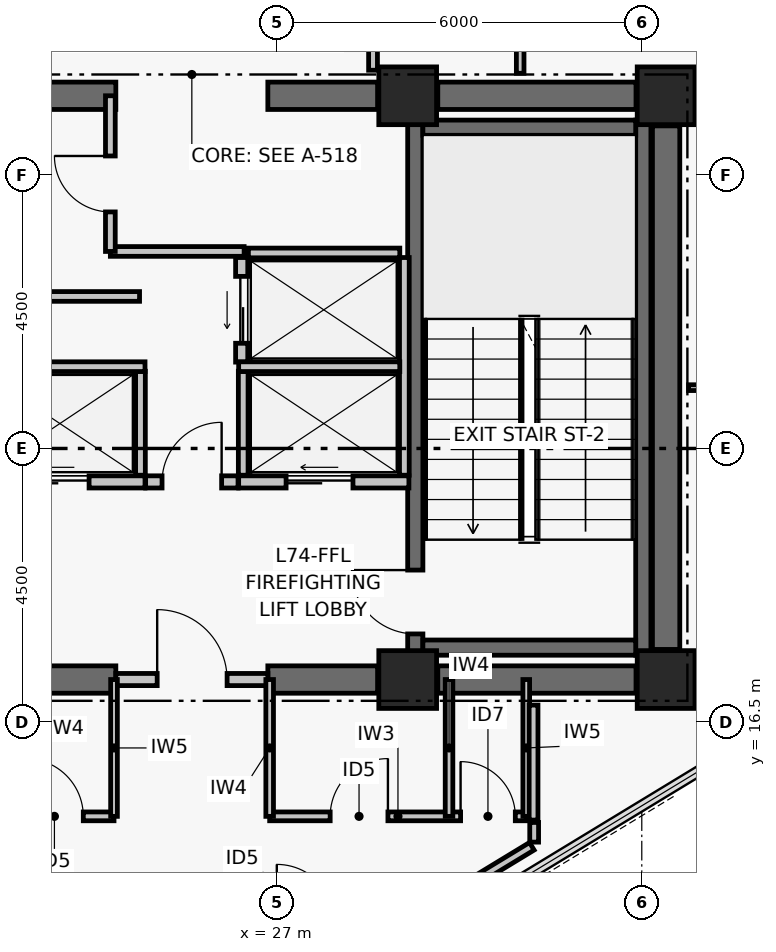
"""IFC4 building model, lengths in metres.
Left out: names, types, materials, properties, quantities, classifications, styles, units other than length and angle.
Written with IfcOpenShell. Run it as: python <this file> out.ifc"""

import sys

from ifc_helpers import new_model, si_unit, direction, frame, frame_2d, origin, origin_2d, place, context, subcontext, project, spatial, rectangle, extrude, element, fill, save


model = new_model("IFC4")
c1 = context("Model", 3, precision=1e-05, world=origin(), true_north=direction((0.0, 1.0)))
c2 = subcontext(c1, "Body", "Model", "MODEL_VIEW")
j1 = project(units=[si_unit("LENGTHUNIT", "METRE"), si_unit("PLANEANGLEUNIT", "RADIAN")], contexts=[c1])
p1 = place(None, origin())
s1 = spatial("IfcSite", under=j1, at=p1, CompositionType="ELEMENT")
p2 = place(p1, origin())
s2 = spatial("IfcBuilding", under=s1, at=p2, CompositionType="ELEMENT")
p3 = place(p2, frame((0.0, 0.0, 291.78)))
s3 = spatial("IfcBuildingStorey", under=s2, at=p3, CompositionType="ELEMENT", Elevation=291.78)
for number, where, z_axis, x_axis in (
    (1, (29.15, 17.2, 0.0), (0.0, 0.0, 1.0), (1.0, 0.0, 0.0)),
    (2, (33.4, 17.2, 0.0), (0.0, 0.0, 1.0), (1.0, 0.0, 0.0)),
    (3, (29.15, 26.8, 0.0), (0.0, 0.0, 1.0), (1.0, 0.0, 0.0)),
    (4, (33.4, 26.8, 0.0), (0.0, 0.0, 1.0), (1.0, 0.0, 0.0)),
):
    element("IfcColumn", number, at=place(p3, frame(where, z_axis=z_axis, x_axis=x_axis)), inside=s3, PredefinedType="COLUMN", context=c2, shape_type="SweptSolid", body=[
        extrude(rectangle(XDim=0.95, YDim=0.95, at=origin_2d()), origin(), (0.0, 0.0, 1.0), 3.72),
    ])
p4 = place(p3, frame((22.545, 17.2, 0.0), z_axis=(0.0, 0.0, 1.0), x_axis=(1.0, 0.0, 0.0)))
e5 = element("IfcWall", 5, at=p4, inside=s3, PredefinedType="SHEAR", context=c2, shape_type="SweptSolid", body=[
    extrude(rectangle(XDim=1.805, YDim=0.45, at=frame_2d((0.903, 0.0))), origin(), (0.0, 0.0, 1.0), 3.5),
])
p5 = place(p3, frame((26.85, 17.2, 0.0), z_axis=(0.0, 0.0, 1.0), x_axis=(1.0, 0.0, 0.0)))
e6 = element("IfcWall", 6, at=p5, inside=s3, PredefinedType="SHEAR", context=c2, shape_type="SweptSolid", body=[
    extrude(rectangle(XDim=1.805, YDim=0.45, at=frame_2d((0.902, 0.0))), origin(), (0.0, 0.0, 1.0), 3.5),
])
p6 = place(p3, frame((29.645, 17.2, 0.0), z_axis=(0.0, 0.0, 1.0), x_axis=(1.0, 0.0, 0.0)))
e7 = element("IfcWall", 7, at=p6, inside=s3, PredefinedType="SHEAR", context=c2, shape_type="SweptSolid", body=[
    extrude(rectangle(XDim=3.26, YDim=0.45, at=frame_2d((1.63, 0.0))), origin(), (0.0, 0.0, 1.0), 3.5),
])
p7 = place(p3, frame((22.545, 26.8, 0.0), z_axis=(0.0, 0.0, 1.0), x_axis=(1.0, 0.0, 0.0)))
e8 = element("IfcWall", 8, at=p7, inside=s3, PredefinedType="SHEAR", context=c2, shape_type="SweptSolid", body=[
    extrude(rectangle(XDim=1.805, YDim=0.45, at=frame_2d((0.903, 0.0))), origin(), (0.0, 0.0, 1.0), 3.5),
])
p8 = place(p3, frame((26.85, 26.8, 0.0), z_axis=(0.0, 0.0, 1.0), x_axis=(1.0, 0.0, 0.0)))
e9 = element("IfcWall", 9, at=p8, inside=s3, PredefinedType="SHEAR", context=c2, shape_type="SweptSolid", body=[
    extrude(rectangle(XDim=1.805, YDim=0.45, at=frame_2d((0.902, 0.0))), origin(), (0.0, 0.0, 1.0), 3.5),
])
p9 = place(p3, frame((29.645, 26.8, 0.0), z_axis=(0.0, 0.0, 1.0), x_axis=(1.0, 0.0, 0.0)))
e10 = element("IfcWall", 10, at=p9, inside=s3, PredefinedType="SHEAR", context=c2, shape_type="SweptSolid", body=[
    extrude(rectangle(XDim=3.26, YDim=0.45, at=frame_2d((1.63, 0.0))), origin(), (0.0, 0.0, 1.0), 3.5),
])
p10 = place(p3, frame((33.4, 17.695, 0.0), z_axis=(0.0, 0.0, 1.0), x_axis=(0.0, 1.0, 0.0)))
e11 = element("IfcWall", 11, at=p10, inside=s3, PredefinedType="SHEAR", context=c2, shape_type="SweptSolid", body=[
    extrude(rectangle(XDim=8.61, YDim=0.45, at=frame_2d((4.305, 0.0))), origin(), (0.0, 0.0, 1.0), 3.5),
])
p11 = place(p3, frame((29.275, 17.6, 0.0), z_axis=(0.0, 0.0, 1.0), x_axis=(0.0, 1.0, 0.0)))
e12 = element("IfcWall", 12, at=p11, inside=s3, PredefinedType="SHEAR", context=c2, shape_type="SweptSolid", body=[
    extrude(rectangle(XDim=8.8, YDim=0.25, at=frame_2d((4.4, 0.0))), origin(), (0.0, 0.0, 1.0), 3.5),
])
p12 = place(p11, frame((0.35, 0.0, 0.0)))
e13 = element("IfcOpeningElement", 13, at=p12, cuts=e12, PredefinedType="OPENING", context=c2, shape_type="SweptSolid", body=[
    extrude(rectangle(XDim=1.05, YDim=2.08, at=frame_2d((0.525, 1.04))), frame((0.0, 0.135, 0.0), z_axis=(0.0, -1.0, 0.0), x_axis=(1.0, 0.0, 0.0)), (0.0, 0.0, 1.0), 0.27),
])
p13 = place(p3, frame((33.025, 17.6, 0.0), z_axis=(0.0, 0.0, 1.0), x_axis=(0.0, 1.0, 0.0)))
e14 = element("IfcWall", 14, at=p13, inside=s3, PredefinedType="SHEAR", context=c2, shape_type="SweptSolid", body=[
    extrude(rectangle(XDim=8.8, YDim=0.25, at=frame_2d((4.4, 0.0))), origin(), (0.0, 0.0, 1.0), 3.5),
])
for number, where, z_axis, x_axis in (
    (15, (29.4, 17.725, 0.0), (0.0, 0.0, 1.0), (1.0, 0.0, 0.0)),
    (16, (29.4, 26.275, 0.0), (0.0, 0.0, 1.0), (1.0, 0.0, 0.0)),
):
    element("IfcWall", number, at=place(p3, frame(where, z_axis=z_axis, x_axis=x_axis)), inside=s3, PredefinedType="SHEAR", context=c2, shape_type="SweptSolid", body=[
        extrude(rectangle(XDim=3.5, YDim=0.25, at=frame_2d((1.75, 0.0))), origin(), (0.0, 0.0, 1.0), 3.5),
    ])
p14 = place(p3, frame((24.35, 17.2, 0.0), z_axis=(0.0, 0.0, 1.0), x_axis=(1.0, 0.0, 0.0)))
e17 = element("IfcWall", 17, at=p14, inside=s3, PredefinedType="PARTITIONING", context=c2, shape_type="SweptSolid", body=[
    extrude(rectangle(XDim=2.5, YDim=0.2, at=frame_2d((1.25, 0.0))), origin(), (0.0, 0.0, 1.0), 2.63),
])
p15 = place(p14, frame((0.68, 0.0, 0.0)))
e18 = element("IfcOpeningElement", 18, at=p15, cuts=e17, PredefinedType="OPENING", context=c2, shape_type="SweptSolid", body=[
    extrude(rectangle(XDim=1.15, YDim=2.08, at=frame_2d((0.575, 1.04))), frame((0.0, 0.11, 0.0), z_axis=(0.0, -1.0, 0.0), x_axis=(1.0, 0.0, 0.0)), (0.0, 0.0, 1.0), 0.22),
])
p16 = place(p3, frame((24.84, 20.45, 0.0), z_axis=(0.0, 0.0, 1.0), x_axis=(1.0, 0.0, 0.0)))
e19 = element("IfcWall", 19, at=p16, inside=s3, PredefinedType="PARTITIONING", context=c2, shape_type="SweptSolid", body=[
    extrude(rectangle(XDim=1.52, YDim=0.2, at=frame_2d((0.76, 0.0))), origin(), (0.0, 0.0, 1.0), 3.5),
])
p17 = place(p16, frame((0.27, 0.0, 0.0)))
e20 = element("IfcOpeningElement", 20, at=p17, cuts=e19, PredefinedType="OPENING", context=c2, shape_type="SweptSolid", body=[
    extrude(rectangle(XDim=0.98, YDim=2.06, at=frame_2d((0.49, 1.03))), frame((0.0, 0.11, 0.0), z_axis=(0.0, -1.0, 0.0), x_axis=(1.0, 0.0, 0.0)), (0.0, 0.0, 1.0), 0.22),
])
p18 = place(p3, frame((22.03, 20.45, 0.0), z_axis=(0.0, 0.0, 1.0), x_axis=(1.0, 0.0, 0.0)))
e21 = element("IfcWall", 21, at=p18, inside=s3, PredefinedType="PARTITIONING", context=c2, shape_type="SweptSolid", body=[
    extrude(rectangle(XDim=2.8, YDim=0.2, at=frame_2d((1.4, 0.0))), origin(), (0.0, 0.0, 1.0), 3.5),
])
p19 = place(p18, frame((0.78, 0.0, 0.0)))
e22 = element("IfcOpeningElement", 22, at=p19, cuts=e21, PredefinedType="OPENING", context=c2, shape_type="SweptSolid", body=[
    extrude(rectangle(XDim=1.1, YDim=2.08, at=frame_2d((0.55, 1.04))), frame((0.0, 0.11, 0.0), z_axis=(0.0, -1.0, 0.0), x_axis=(1.0, 0.0, 0.0)), (0.0, 0.0, 1.0), 0.22),
])
p20 = place(p3, frame((26.37, 20.45, 0.0), z_axis=(0.0, 0.0, 1.0), x_axis=(1.0, 0.0, 0.0)))
e23 = element("IfcWall", 23, at=p20, inside=s3, PredefinedType="PARTITIONING", context=c2, shape_type="SweptSolid", body=[
    extrude(rectangle(XDim=2.8, YDim=0.2, at=frame_2d((1.4, 0.0))), origin(), (0.0, 0.0, 1.0), 3.5),
])
p21 = place(p20, frame((0.78, 0.0, 0.0)))
e24 = element("IfcOpeningElement", 24, at=p21, cuts=e23, PredefinedType="OPENING", context=c2, shape_type="SweptSolid", body=[
    extrude(rectangle(XDim=1.1, YDim=2.08, at=frame_2d((0.55, 1.04))), frame((0.0, 0.11, 0.0), z_axis=(0.0, -1.0, 0.0), x_axis=(1.0, 0.0, 0.0)), (0.0, 0.0, 1.0), 0.22),
])
p22 = place(p3, frame((26.42, 22.42, 0.0), z_axis=(0.0, 0.0, 1.0), x_axis=(0.0, 1.0, 0.0)))
e25 = element("IfcWall", 25, at=p22, inside=s3, PredefinedType="PARTITIONING", context=c2, shape_type="SweptSolid", body=[
    extrude(rectangle(XDim=1.72, YDim=0.2, at=frame_2d((0.86, 0.0))), origin(), (0.0, 0.0, 1.0), 3.5),
])
p23 = place(p22, frame((0.31, 0.0, 0.0)))
e26 = element("IfcOpeningElement", 26, at=p23, cuts=e25, PredefinedType="OPENING", context=c2, shape_type="SweptSolid", body=[
    extrude(rectangle(XDim=1.1, YDim=2.08, at=frame_2d((0.55, 1.04))), frame((0.0, 0.11, 0.0), z_axis=(0.0, -1.0, 0.0), x_axis=(1.0, 0.0, 0.0)), (0.0, 0.0, 1.0), 0.22),
])
p24 = place(p3, frame((24.755, 20.56, 0.0), z_axis=(0.0, 0.0, 1.0), x_axis=(0.0, 1.0, 0.0)))
e27 = element("IfcWall", 27, at=p24, inside=s3, PredefinedType="PARTITIONING", context=c2, shape_type="SweptSolid", body=[
    extrude(rectangle(XDim=1.71, YDim=0.16, at=frame_2d((0.855, 0.0))), origin(), (0.0, 0.0, 1.0), 3.5),
])
p25 = place(p3, frame((22.18, 22.345, 0.0), z_axis=(0.0, 0.0, 1.0), x_axis=(1.0, 0.0, 0.0)))
e28 = element("IfcWall", 28, at=p25, inside=s3, PredefinedType="PARTITIONING", context=c2, shape_type="SweptSolid", body=[
    extrude(rectangle(XDim=2.65, YDim=0.16, at=frame_2d((1.325, 0.0))), origin(), (0.0, 0.0, 1.0), 3.5),
])
p26 = place(p3, frame((29.095, 20.56, 0.0), z_axis=(0.0, 0.0, 1.0), x_axis=(0.0, 1.0, 0.0)))
e29 = element("IfcWall", 29, at=p26, inside=s3, PredefinedType="PARTITIONING", context=c2, shape_type="SweptSolid", body=[
    extrude(rectangle(XDim=3.58, YDim=0.16, at=frame_2d((1.79, 0.0))), origin(), (0.0, 0.0, 1.0), 3.5),
])
p27 = place(p3, frame((26.445, 20.56, 0.0), z_axis=(0.0, 0.0, 1.0), x_axis=(0.0, 1.0, 0.0)))
e30 = element("IfcWall", 30, at=p27, inside=s3, PredefinedType="PARTITIONING", context=c2, shape_type="SweptSolid", body=[
    extrude(rectangle(XDim=1.71, YDim=0.16, at=frame_2d((0.855, 0.0))), origin(), (0.0, 0.0, 1.0), 3.5),
])
p28 = place(p3, frame((26.37, 22.345, 0.0), z_axis=(0.0, 0.0, 1.0), x_axis=(1.0, 0.0, 0.0)))
e31 = element("IfcWall", 31, at=p28, inside=s3, PredefinedType="PARTITIONING", context=c2, shape_type="SweptSolid", body=[
    extrude(rectangle(XDim=2.65, YDim=0.16, at=frame_2d((1.325, 0.0))), origin(), (0.0, 0.0, 1.0), 3.5),
])
p29 = place(p3, frame((26.53, 24.215, 0.0), z_axis=(0.0, 0.0, 1.0), x_axis=(1.0, 0.0, 0.0)))
e32 = element("IfcWall", 32, at=p29, inside=s3, PredefinedType="PARTITIONING", context=c2, shape_type="SweptSolid", body=[
    extrude(rectangle(XDim=2.49, YDim=0.16, at=frame_2d((1.245, 0.0))), origin(), (0.0, 0.0, 1.0), 3.5),
])
p30 = place(p3, frame((23.04, 23.5, 0.0), z_axis=(0.0, 0.0, 1.0), x_axis=(1.0, 0.0, 0.0)))
e33 = element("IfcWall", 33, at=p30, inside=s3, PredefinedType="PARTITIONING", context=c2, shape_type="SweptSolid", body=[
    extrude(rectangle(XDim=1.7, YDim=0.16, at=frame_2d((0.85, 0.0))), origin(), (0.0, 0.0, 1.0), 3.5),
])
p31 = place(p3, frame((24.26, 24.24, 0.0), z_axis=(0.0, 0.0, 1.0), x_axis=(1.0, 0.0, 0.0)))
e34 = element("IfcWall", 34, at=p31, inside=s3, PredefinedType="PARTITIONING", context=c2, shape_type="SweptSolid", body=[
    extrude(rectangle(XDim=2.2, YDim=0.16, at=frame_2d((1.1, 0.0))), origin(), (0.0, 0.0, 1.0), 3.5),
])
p32 = place(p3, frame((24.26, 24.24, 0.0), z_axis=(0.0, 0.0, 1.0), x_axis=(0.0, 1.0, 0.0)))
e35 = element("IfcWall", 35, at=p32, inside=s3, PredefinedType="PARTITIONING", context=c2, shape_type="SweptSolid", body=[
    extrude(rectangle(XDim=2.56, YDim=0.16, at=frame_2d((1.28, 0.0))), origin(), (0.0, 0.0, 1.0), 2.63),
])
p33 = place(p32, frame((0.65, 0.0, 0.0)))
e36 = element("IfcOpeningElement", 36, at=p33, cuts=e35, PredefinedType="OPENING", context=c2, shape_type="SweptSolid", body=[
    extrude(rectangle(XDim=0.92, YDim=2.05, at=frame_2d((0.46, 1.025))), frame((0.0, 0.09, 0.0), z_axis=(0.0, -1.0, 0.0), x_axis=(1.0, 0.0, 0.0)), (0.0, 0.0, 1.0), 0.18),
])
p34 = place(p3, frame((19.1, 14.95, 0.0), z_axis=(0.0, 0.0, 1.0), x_axis=(1.0, 0.0, 0.0)))
e37 = element("IfcWall", 37, at=p34, inside=s3, PredefinedType="PARTITIONING", context=c2, shape_type="SweptSolid", body=[
    extrude(rectangle(XDim=5.22, YDim=0.145, at=frame_2d((2.61, 0.0))), origin(), (0.0, 0.0, 1.0), 2.83),
])
p35 = place(p34, frame((0.2, 0.0, 0.0)))
e38 = element("IfcOpeningElement", 38, at=p35, cuts=e37, PredefinedType="OPENING", context=c2, shape_type="SweptSolid", body=[
    extrude(rectangle(XDim=0.9, YDim=2.02, at=frame_2d((0.45, 1.01))), frame((0.0, 0.083, 0.0), z_axis=(0.0, -1.0, 0.0), x_axis=(1.0, 0.0, 0.0)), (0.0, 0.0, 1.0), 0.165),
])
p36 = place(p34, frame((1.805, 0.0, 0.0)))
e39 = element("IfcOpeningElement", 39, at=p36, cuts=e37, PredefinedType="OPENING", context=c2, shape_type="SweptSolid", body=[
    extrude(rectangle(XDim=0.95, YDim=2.06, at=frame_2d((0.475, 1.03))), frame((0.0, 0.083, 0.0), z_axis=(0.0, -1.0, 0.0), x_axis=(1.0, 0.0, 0.0)), (0.0, 0.0, 1.0), 0.165),
])
p37 = place(p34, frame((3.765, 0.0, 0.0)))
e40 = element("IfcOpeningElement", 40, at=p37, cuts=e37, PredefinedType="OPENING", context=c2, shape_type="SweptSolid", body=[
    extrude(rectangle(XDim=0.95, YDim=2.06, at=frame_2d((0.475, 1.03))), frame((0.0, 0.083, 0.0), z_axis=(0.0, -1.0, 0.0), x_axis=(1.0, 0.0, 0.0)), (0.0, 0.0, 1.0), 0.165),
])
p38 = place(p3, frame((26.88, 14.95, 0.0), z_axis=(0.0, 0.0, 1.0), x_axis=(1.0, 0.0, 0.0)))
e41 = element("IfcWall", 41, at=p38, inside=s3, PredefinedType="PARTITIONING", context=c2, shape_type="SweptSolid", body=[
    extrude(rectangle(XDim=4.22, YDim=0.145, at=frame_2d((2.11, 0.0))), origin(), (0.0, 0.0, 1.0), 2.98),
])
p39 = place(p38, frame((0.995, 0.0, 0.0)))
e42 = element("IfcOpeningElement", 42, at=p39, cuts=e41, PredefinedType="OPENING", context=c2, shape_type="SweptSolid", body=[
    extrude(rectangle(XDim=0.95, YDim=2.06, at=frame_2d((0.475, 1.03))), frame((0.0, 0.083, 0.0), z_axis=(0.0, -1.0, 0.0), x_axis=(1.0, 0.0, 0.0)), (0.0, 0.0, 1.0), 0.165),
])
p40 = place(p38, frame((3.14, 0.0, 0.0)))
e43 = element("IfcOpeningElement", 43, at=p40, cuts=e41, PredefinedType="OPENING", context=c2, shape_type="SweptSolid", body=[
    extrude(rectangle(XDim=0.9, YDim=2.02, at=frame_2d((0.45, 1.01))), frame((0.0, 0.083, 0.0), z_axis=(0.0, -1.0, 0.0), x_axis=(1.0, 0.0, 0.0)), (0.0, 0.0, 1.0), 0.165),
])
p41 = place(p3, frame((24.32, 14.95, 0.0), z_axis=(0.0, 0.0, 1.0), x_axis=(0.0, 1.0, 0.0)))
e44 = element("IfcWall", 44, at=p41, inside=s3, PredefinedType="PARTITIONING", context=c2, shape_type="SweptSolid", body=[
    extrude(rectangle(XDim=2.25, YDim=0.11, at=frame_2d((1.125, 0.0))), origin(), (0.0, 0.0, 1.0), 2.63),
])
for number, where, z_axis, x_axis in (
    (45, (26.88, 14.95, 0.0), (0.0, 0.0, 1.0), (0.0, 1.0, 0.0)),
    (46, (29.83, 14.95, 0.0), (0.0, 0.0, 1.0), (0.0, 1.0, 0.0)),
):
    element("IfcWall", number, at=place(p3, frame(where, z_axis=z_axis, x_axis=x_axis)), inside=s3, PredefinedType="PARTITIONING", context=c2, shape_type="SweptSolid", body=[
        extrude(rectangle(XDim=2.25, YDim=0.125, at=frame_2d((1.125, 0.0))), origin(), (0.0, 0.0, 1.0), 2.63),
    ])
p42 = place(p3, frame((31.1, 14.95, 0.0), z_axis=(0.0, 0.0, 1.0), x_axis=(0.0, 1.0, 0.0)))
e47 = element("IfcWall", 47, at=p42, inside=s3, PredefinedType="PARTITIONING", context=c2, shape_type="SweptSolid", body=[
    extrude(rectangle(XDim=2.25, YDim=0.11, at=frame_2d((1.125, 0.0))), origin(), (0.0, 0.0, 1.0), 2.63),
])
p43 = place(p3, frame((29.168, 13.229, 0.0), z_axis=(0.0, 0.0, 1.0), x_axis=(0.854678044033, 0.519158396876, 0.0)))
e48 = element("IfcWall", 48, at=p43, inside=s3, PredefinedType="PARTITIONING", context=c2, shape_type="SweptSolid", body=[
    extrude(rectangle(XDim=2.368, YDim=0.145, at=frame_2d((1.184, 0.0))), origin(), (0.0, 0.0, 1.0), 3.5),
])
p44 = place(p3, frame((31.23, 14.526, 0.0), z_axis=(0.0, 0.0, 1.0), x_axis=(0.0, 1.0, 0.0)))
e49 = element("IfcWall", 49, at=p44, inside=s3, PredefinedType="PARTITIONING", context=c2, shape_type="SweptSolid", body=[
    extrude(rectangle(XDim=0.324, YDim=0.145, at=frame_2d((0.162, 0.0))), origin(), (0.0, 0.0, 1.0), 3.5),
])
p45 = place(p3, frame((31.22, 14.889, 0.0), z_axis=(0.0, 0.0, 1.0), x_axis=(0.0, 1.0, 0.0)))
e50 = element("IfcWall", 50, at=p45, inside=s3, PredefinedType="PARTITIONING", context=c2, shape_type="SweptSolid", body=[
    extrude(rectangle(XDim=1.891, YDim=0.145, at=frame_2d((0.946, 0.0))), origin(), (0.0, 0.0, 1.0), 2.63),
])
p46 = place(p3, frame((28.58, 27.22, 0.0), z_axis=(0.0, 0.0, 1.0), x_axis=(0.0, 1.0, 0.0)))
e51 = element("IfcWall", 51, at=p46, inside=s3, PredefinedType="PARTITIONING", context=c2, shape_type="SweptSolid", body=[
    extrude(rectangle(XDim=1.48, YDim=0.145, at=frame_2d((0.74, 0.0))), origin(), (0.0, 0.0, 1.0), 2.63),
])
p47 = place(p3, frame((31.0, 27.17, 0.0), z_axis=(0.0, 0.0, 1.0), x_axis=(0.0, 1.0, 0.0)))
e52 = element("IfcWall", 52, at=p47, inside=s3, PredefinedType="PARTITIONING", context=c2, shape_type="SweptSolid", body=[
    extrude(rectangle(XDim=2.933, YDim=0.125, at=frame_2d((1.467, 0.0))), origin(), (0.0, 0.0, 1.0), 2.63),
])
p48 = place(p3, frame((33.77, 22.0, 0.0), z_axis=(0.0, 0.0, 1.0), x_axis=(1.0, 0.0, 0.0)))
e53 = element("IfcWall", 53, at=p48, inside=s3, PredefinedType="PARTITIONING", context=c2, shape_type="SweptSolid", body=[
    extrude(rectangle(XDim=7.412, YDim=0.095, at=frame_2d((3.706, 0.0))), origin(), (0.0, 0.0, 1.0), 2.63),
])
p49 = place(p48, frame((0.28, 0.0, 0.0)))
e54 = element("IfcOpeningElement", 54, at=p49, cuts=e53, PredefinedType="OPENING", context=c2, shape_type="SweptSolid", body=[
    extrude(rectangle(XDim=0.92, YDim=2.05, at=frame_2d((0.46, 1.025))), frame((0.0, 0.057, 0.0), z_axis=(0.0, -1.0, 0.0), x_axis=(1.0, 0.0, 0.0)), (0.0, 0.0, 1.0), 0.115),
])
p50 = place(p12, origin())
e55 = element("IfcDoor", 55, at=p50, inside=s3, OperationType="SINGLE_SWING_RIGHT", PredefinedType="DOOR", context=c2, shape_type="SweptSolid", body=[
    extrude(rectangle(XDim=1.05, YDim=2.08, at=frame_2d((0.525, 1.04))), frame((0.0, 0.025, 0.0), z_axis=(0.0, -1.0, 0.0), x_axis=(1.0, 0.0, 0.0)), (0.0, 0.0, 1.0), 0.05),
])
fill(e13, e55)
p51 = place(p15, origin())
e56 = element("IfcDoor", 56, at=p51, inside=s3, OperationType="SINGLE_SWING_LEFT", PredefinedType="DOOR", context=c2, shape_type="SweptSolid", body=[
    extrude(rectangle(XDim=1.15, YDim=2.08, at=frame_2d((0.575, 1.04))), frame((0.0, 0.025, 0.0), z_axis=(0.0, -1.0, 0.0), x_axis=(1.0, 0.0, 0.0)), (0.0, 0.0, 1.0), 0.05),
])
fill(e18, e56)
p52 = place(p17, origin())
e57 = element("IfcDoor", 57, at=p52, inside=s3, OperationType="SINGLE_SWING_RIGHT", PredefinedType="DOOR", context=c2, shape_type="SweptSolid", body=[
    extrude(rectangle(XDim=0.98, YDim=2.06, at=frame_2d((0.49, 1.03))), frame((0.0, 0.025, 0.0), z_axis=(0.0, -1.0, 0.0), x_axis=(1.0, 0.0, 0.0)), (0.0, 0.0, 1.0), 0.05),
])
fill(e20, e57)
p53 = place(p19, origin())
e58 = element("IfcDoor", 58, at=p53, inside=s3, OperationType="DOUBLE_DOOR_SLIDING", PredefinedType="DOOR", context=c2, shape_type="SweptSolid", body=[
    extrude(rectangle(XDim=1.1, YDim=2.08, at=frame_2d((0.55, 1.04))), frame((0.0, 0.025, 0.0), z_axis=(0.0, -1.0, 0.0), x_axis=(1.0, 0.0, 0.0)), (0.0, 0.0, 1.0), 0.05),
])
fill(e22, e58)
p54 = place(p21, origin())
e59 = element("IfcDoor", 59, at=p54, inside=s3, OperationType="DOUBLE_DOOR_SLIDING", PredefinedType="DOOR", context=c2, shape_type="SweptSolid", body=[
    extrude(rectangle(XDim=1.1, YDim=2.08, at=frame_2d((0.55, 1.04))), frame((0.0, 0.025, 0.0), z_axis=(0.0, -1.0, 0.0), x_axis=(1.0, 0.0, 0.0)), (0.0, 0.0, 1.0), 0.05),
])
fill(e24, e59)
p55 = place(p23, origin())
e60 = element("IfcDoor", 60, at=p55, inside=s3, OperationType="DOUBLE_DOOR_SLIDING", PredefinedType="DOOR", context=c2, shape_type="SweptSolid", body=[
    extrude(rectangle(XDim=1.1, YDim=2.08, at=frame_2d((0.55, 1.04))), frame((0.0, 0.025, 0.0), z_axis=(0.0, -1.0, 0.0), x_axis=(1.0, 0.0, 0.0)), (0.0, 0.0, 1.0), 0.05),
])
fill(e26, e60)
p56 = place(p33, origin())
e61 = element("IfcDoor", 61, at=p56, inside=s3, OperationType="SINGLE_SWING_RIGHT", PredefinedType="DOOR", context=c2, shape_type="SweptSolid", body=[
    extrude(rectangle(XDim=0.92, YDim=2.05, at=frame_2d((0.46, 1.025))), frame((0.0, 0.025, 0.0), z_axis=(0.0, -1.0, 0.0), x_axis=(1.0, 0.0, 0.0)), (0.0, 0.0, 1.0), 0.05),
])
fill(e36, e61)
p57 = place(p37, origin())
e62 = element("IfcDoor", 62, at=p57, inside=s3, OperationType="SINGLE_SWING_LEFT", PredefinedType="DOOR", context=c2, shape_type="SweptSolid", body=[
    extrude(rectangle(XDim=0.95, YDim=2.06, at=frame_2d((0.475, 1.03))), frame((0.0, 0.025, 0.0), z_axis=(0.0, -1.0, 0.0), x_axis=(1.0, 0.0, 0.0)), (0.0, 0.0, 1.0), 0.05),
])
fill(e40, e62)
p58 = place(p39, origin())
e63 = element("IfcDoor", 63, at=p58, inside=s3, OperationType="SINGLE_SWING_RIGHT", PredefinedType="DOOR", context=c2, shape_type="SweptSolid", body=[
    extrude(rectangle(XDim=0.95, YDim=2.06, at=frame_2d((0.475, 1.03))), frame((0.0, 0.025, 0.0), z_axis=(0.0, -1.0, 0.0), x_axis=(1.0, 0.0, 0.0)), (0.0, 0.0, 1.0), 0.05),
])
fill(e42, e63)
p59 = place(p40, origin())
e64 = element("IfcDoor", 64, at=p59, inside=s3, OperationType="SINGLE_SWING_LEFT", PredefinedType="DOOR", context=c2, shape_type="SweptSolid", body=[
    extrude(rectangle(XDim=0.9, YDim=2.02, at=frame_2d((0.45, 1.01))), frame((0.0, 0.025, 0.0), z_axis=(0.0, -1.0, 0.0), x_axis=(1.0, 0.0, 0.0)), (0.0, 0.0, 1.0), 0.05),
])
fill(e43, e64)
save(model, sys.argv[1])
